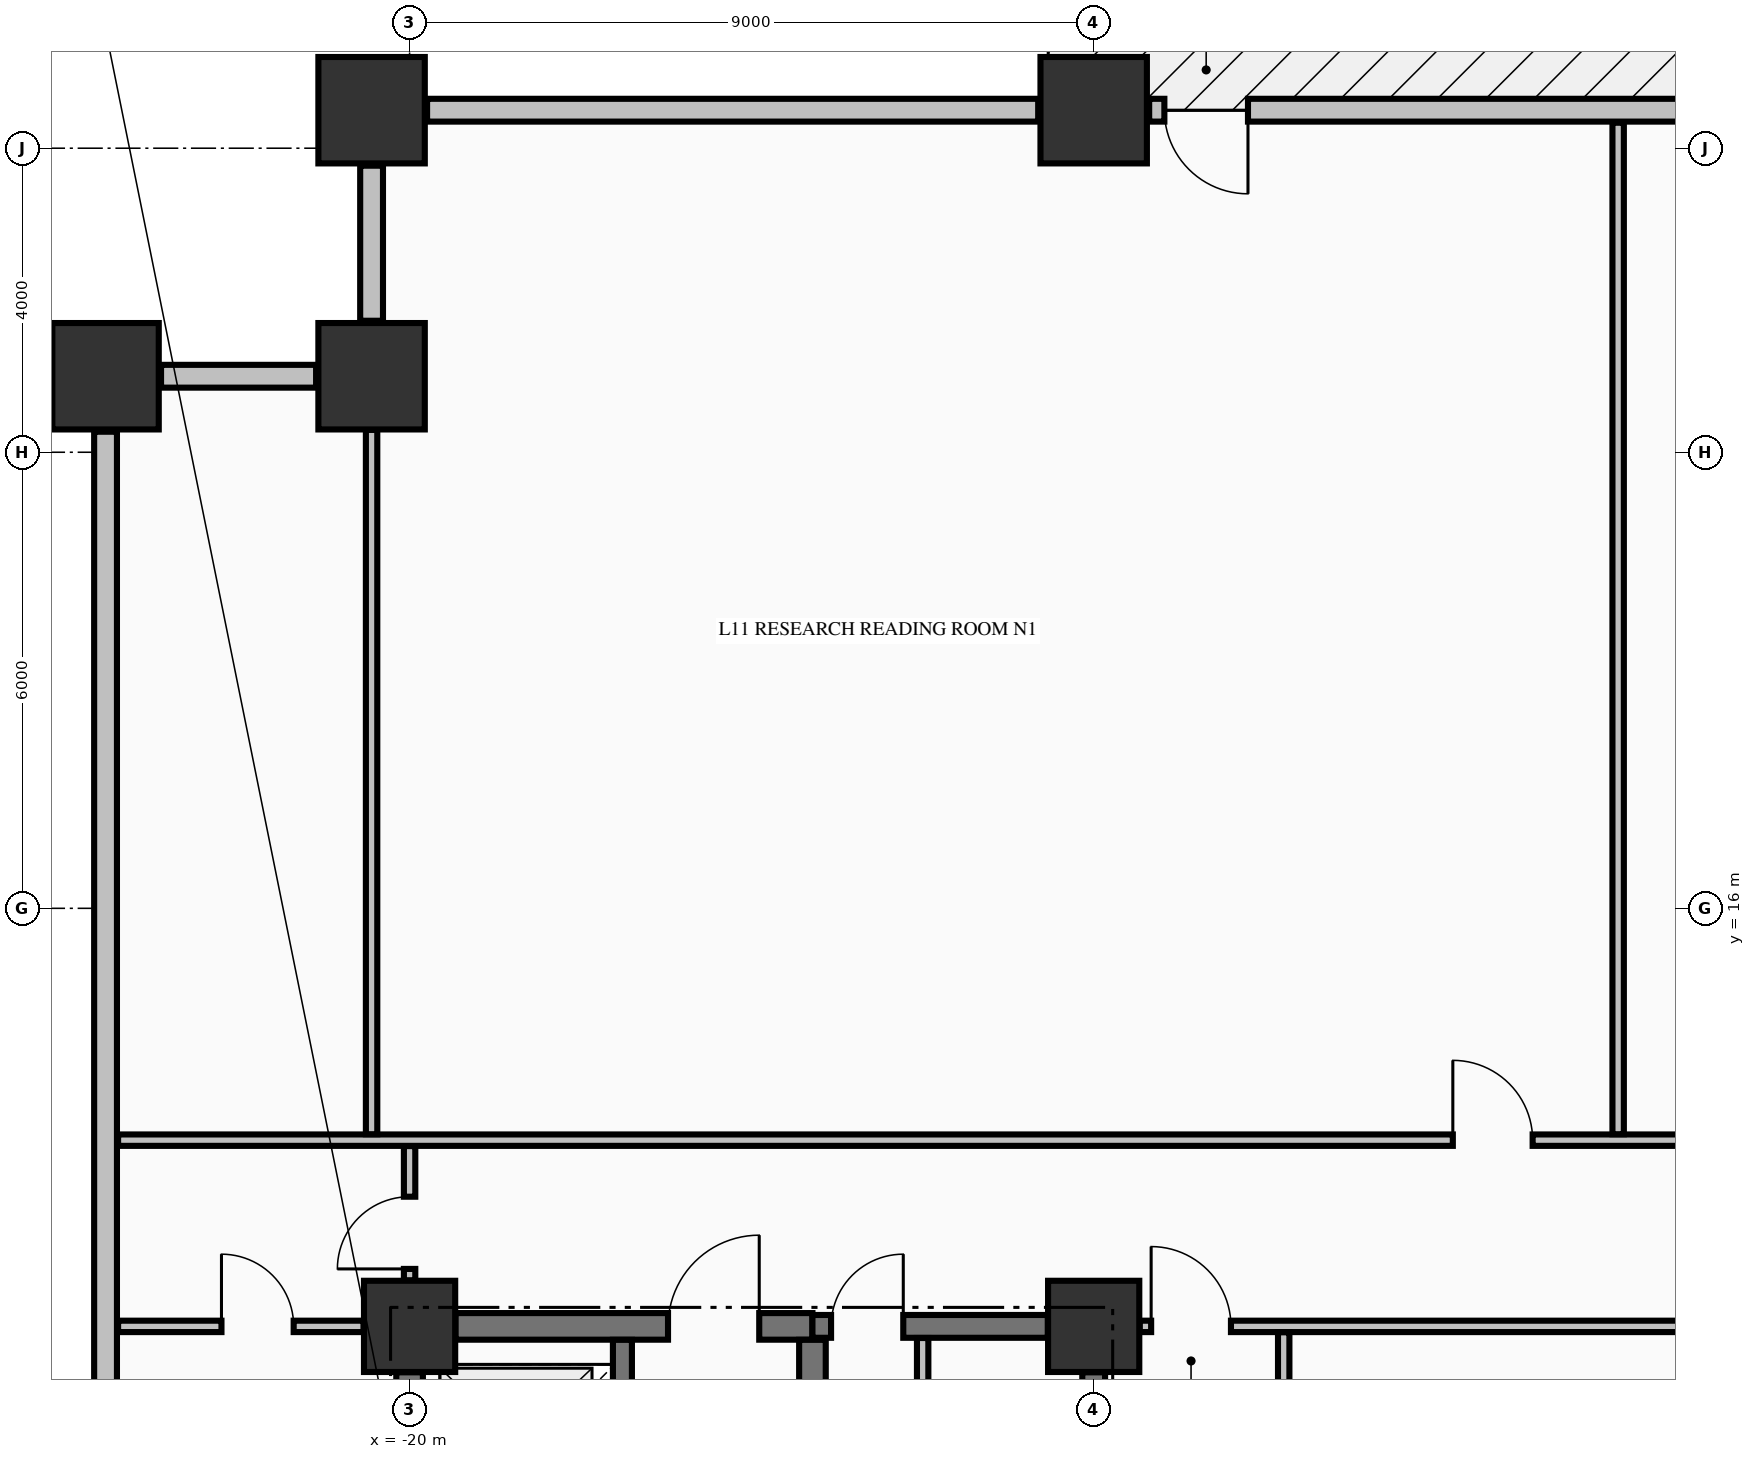
"""IFC4 building model, lengths in metres.
Left out: names, types, materials, properties, quantities, classifications, styles, units other than length and angle.
Written with IfcOpenShell. Run it as: python <this file> out.ifc"""

import sys

from ifc_helpers import new_model, si_unit, direction, frame, frame_2d, origin, origin_2d, place, context, subcontext, project, spatial, rectangle, extrude, element, fill, save


model = new_model("IFC4")
c1 = context("Model", 3, precision=1e-05, world=origin(), true_north=direction((0.0, 1.0)))
c2 = subcontext(c1, "Body", "Model", "MODEL_VIEW")
j1 = project(units=[si_unit("LENGTHUNIT", "METRE"), si_unit("PLANEANGLEUNIT", "RADIAN")], contexts=[c1])
p1 = place(None, origin())
s1 = spatial("IfcSite", under=j1, at=p1, CompositionType="ELEMENT")
p2 = place(p1, origin())
s2 = spatial("IfcBuilding", under=s1, at=p2, CompositionType="ELEMENT")
p3 = place(p2, frame((0.0, 0.0, 48.62)))
s3 = spatial("IfcBuildingStorey", under=s2, at=p3, CompositionType="ELEMENT", Elevation=48.62)
for number, where, z_axis, x_axis in (
    (1, (-20.5, 26.5, -0.25), (0.0, 0.0, 1.0), (1.0, 0.0, 0.0)),
    (2, (-11.0, 26.5, -0.25), (0.0, 0.0, 1.0), (1.0, 0.0, 0.0)),
    (3, (-24.0, 23.0, -0.25), (0.0, 0.0, 1.0), (1.0, 0.0, 0.0)),
    (4, (-20.5, 23.0, -0.25), (0.0, 0.0, 1.0), (1.0, 0.0, 0.0)),
):
    element("IfcColumn", number, at=place(p3, frame(where, z_axis=z_axis, x_axis=x_axis)), inside=s3, PredefinedType="COLUMN", context=c2, shape_type="SweptSolid", body=[
        extrude(rectangle(XDim=1.4, YDim=1.4, at=origin_2d()), origin(), (0.0, 0.0, 1.0), 3.395),
    ])
for number, where, z_axis, x_axis in (
    (5, (-20.0, 10.5, -0.25), (0.0, 0.0, 1.0), (1.0, 0.0, 0.0)),
    (6, (-11.0, 10.5, -0.25), (0.0, 0.0, 1.0), (1.0, 0.0, 0.0)),
):
    element("IfcColumn", number, at=place(p3, frame(where, z_axis=z_axis, x_axis=x_axis)), inside=s3, PredefinedType="COLUMN", context=c2, shape_type="SweptSolid", body=[
        extrude(rectangle(XDim=1.2, YDim=1.2, at=origin_2d()), origin(), (0.0, 0.0, 1.0), 3.395),
    ])
for number, where, z_axis, x_axis in (
    (7, (-20.5, 25.77, 0.0), (0.0, 0.0, 1.0), (0.0, -1.0, 0.0)),
    (8, (-21.23, 23.0, 0.0), (0.0, 0.0, 1.0), (-1.0, 0.0, 0.0)),
):
    element("IfcWall", number, at=place(p3, frame(where, z_axis=z_axis, x_axis=x_axis)), inside=s3, PredefinedType="STANDARD", context=c2, shape_type="SweptSolid", body=[
        extrude(rectangle(XDim=2.04, YDim=0.3, at=frame_2d((1.02, 0.0))), origin(), (0.0, 0.0, 1.0), 2.537),
    ])
p4 = place(p3, frame((-11.73, 26.5, 0.0), z_axis=(0.0, 0.0, 1.0), x_axis=(-1.0, 0.0, 0.0)))
e9 = element("IfcWall", 9, at=p4, inside=s3, PredefinedType="STANDARD", context=c2, shape_type="SweptSolid", body=[
    extrude(rectangle(XDim=8.04, YDim=0.3, at=frame_2d((4.02, 0.0))), origin(), (0.0, 0.0, 1.0), 2.537),
])
p5 = place(p3, frame((-0.73, 26.5, 0.0), z_axis=(0.0, 0.0, 1.0), x_axis=(-1.0, 0.0, 0.0)))
e10 = element("IfcWall", 10, at=p5, inside=s3, PredefinedType="STANDARD", context=c2, shape_type="SweptSolid", body=[
    extrude(rectangle(XDim=9.54, YDim=0.3, at=frame_2d((4.77, 0.0))), origin(), (0.0, 0.0, 1.0), 2.537),
])
p6 = place(p5, frame((8.24, 0.0, 0.0)))
e11 = element("IfcOpeningElement", 11, at=p6, cuts=e10, PredefinedType="OPENING", context=c2, shape_type="SweptSolid", body=[
    extrude(rectangle(XDim=1.1, YDim=2.15, at=frame_2d((0.55, 1.075))), frame((0.0, 0.16, 0.0), z_axis=(0.0, -1.0, 0.0), x_axis=(1.0, 0.0, 0.0)), (0.0, 0.0, 1.0), 0.32),
])
p7 = place(p3, frame((-24.0, 22.27, 0.0), z_axis=(0.0, 0.0, 1.0), x_axis=(0.0, -1.0, 0.0)))
e12 = element("IfcWall", 12, at=p7, inside=s3, PredefinedType="STANDARD", context=c2, shape_type="SweptSolid", body=[
    extrude(rectangle(XDim=12.54, YDim=0.3, at=frame_2d((6.27, 0.0))), origin(), (0.0, 0.0, 1.0), 2.537),
])
p8 = place(p3, frame((-19.396, 10.5, 0.0), z_axis=(0.0, 0.0, 1.0), x_axis=(1.0, 0.0, 0.0)))
e13 = element("IfcWall", 13, at=p8, inside=s3, PredefinedType="SHEAR", context=c2, shape_type="SweptSolid", body=[
    extrude(rectangle(XDim=4.696, YDim=0.35, at=frame_2d((2.348, 0.0))), origin(), (0.0, 0.0, 1.0), 3.145),
])
p9 = place(p8, frame((2.796, 0.0, 0.0)))
e14 = element("IfcOpeningElement", 14, at=p9, cuts=e13, PredefinedType="OPENING", context=c2, shape_type="SweptSolid", body=[
    extrude(rectangle(XDim=1.2, YDim=2.15, at=frame_2d((0.6, 1.075))), frame((0.0, 0.185, 0.0), z_axis=(0.0, -1.0, 0.0), x_axis=(1.0, 0.0, 0.0)), (0.0, 0.0, 1.0), 0.37),
])
p10 = place(p3, frame((-14.7, 10.5, 0.0), z_axis=(0.0, 0.0, 1.0), x_axis=(1.0, 0.0, 0.0)))
e15 = element("IfcWall", 15, at=p10, inside=s3, PredefinedType="SHEAR", context=c2, shape_type="SweptSolid", body=[
    extrude(rectangle(XDim=3.096, YDim=0.3, at=frame_2d((1.548, 0.0))), origin(), (0.0, 0.0, 1.0), 3.145),
])
p11 = place(p10, frame((0.245, 0.0, 0.0)))
e16 = element("IfcOpeningElement", 16, at=p11, cuts=e15, PredefinedType="OPENING", context=c2, shape_type="SweptSolid", body=[
    extrude(rectangle(XDim=0.95, YDim=2.15, at=frame_2d((0.475, 1.075))), frame((0.0, 0.16, 0.0), z_axis=(0.0, -1.0, 0.0), x_axis=(1.0, 0.0, 0.0)), (0.0, 0.0, 1.0), 0.32),
])
p12 = place(p3, frame((-23.835, 10.5, 0.0), z_axis=(0.0, 0.0, 1.0), x_axis=(1.0, 0.0, 0.0)))
e17 = element("IfcWall", 17, at=p12, inside=s3, PredefinedType="PARTITIONING", context=c2, shape_type="SweptSolid", body=[
    extrude(rectangle(XDim=3.229, YDim=0.15, at=frame_2d((1.615, 0.0))), origin(), (0.0, 0.0, 1.0), 3.145),
])
p13 = place(p12, frame((1.36, 0.0, 0.0)))
e18 = element("IfcOpeningElement", 18, at=p13, cuts=e17, PredefinedType="OPENING", context=c2, shape_type="SweptSolid", body=[
    extrude(rectangle(XDim=0.95, YDim=2.15, at=frame_2d((0.475, 1.075))), frame((0.0, 0.085, 0.0), z_axis=(0.0, -1.0, 0.0), x_axis=(1.0, 0.0, 0.0)), (0.0, 0.0, 1.0), 0.17),
])
p14 = place(p3, frame((-10.394, 10.5, 0.0), z_axis=(0.0, 0.0, 1.0), x_axis=(1.0, 0.0, 0.0)))
e19 = element("IfcWall", 19, at=p14, inside=s3, PredefinedType="PARTITIONING", context=c2, shape_type="SweptSolid", body=[
    extrude(rectangle(XDim=20.788, YDim=0.15, at=frame_2d((10.394, 0.0))), origin(), (0.0, 0.0, 1.0), 3.145),
])
p15 = place(p14, frame((0.15, 0.0, 0.0)))
e20 = element("IfcOpeningElement", 20, at=p15, cuts=e19, PredefinedType="OPENING", context=c2, shape_type="SweptSolid", body=[
    extrude(rectangle(XDim=1.05, YDim=2.15, at=frame_2d((0.525, 1.075))), frame((0.0, 0.085, 0.0), z_axis=(0.0, -1.0, 0.0), x_axis=(1.0, 0.0, 0.0)), (0.0, 0.0, 1.0), 0.17),
])
p16 = place(p14, frame((19.588, 0.0, 0.0)))
e21 = element("IfcOpeningElement", 21, at=p16, cuts=e19, PredefinedType="OPENING", context=c2, shape_type="SweptSolid", body=[
    extrude(rectangle(XDim=1.05, YDim=2.15, at=frame_2d((0.525, 1.075))), frame((0.0, 0.085, 0.0), z_axis=(0.0, -1.0, 0.0), x_axis=(1.0, 0.0, 0.0)), (0.0, 0.0, 1.0), 0.17),
])
p17 = place(p3, frame((-23.835, 12.95, 0.0), z_axis=(0.0, 0.0, 1.0), x_axis=(1.0, 0.0, 0.0)))
e22 = element("IfcWall", 22, at=p17, inside=s3, PredefinedType="PARTITIONING", context=c2, shape_type="SweptSolid", body=[
    extrude(rectangle(XDim=52.67, YDim=0.15, at=frame_2d((26.335, 0.0))), origin(), (0.0, 0.0, 1.0), 3.145),
])
p18 = place(p17, frame((17.56, 0.0, 0.0)))
e23 = element("IfcOpeningElement", 23, at=p18, cuts=e22, PredefinedType="OPENING", context=c2, shape_type="SweptSolid", body=[
    extrude(rectangle(XDim=1.05, YDim=2.15, at=frame_2d((0.525, 1.075))), frame((0.0, 0.085, 0.0), z_axis=(0.0, -1.0, 0.0), x_axis=(1.0, 0.0, 0.0)), (0.0, 0.0, 1.0), 0.17),
])
p19 = place(p17, frame((31.16, 0.0, 0.0)))
e24 = element("IfcOpeningElement", 24, at=p19, cuts=e22, PredefinedType="OPENING", context=c2, shape_type="SweptSolid", body=[
    extrude(rectangle(XDim=1.05, YDim=2.15, at=frame_2d((0.525, 1.075))), frame((0.0, 0.085, 0.0), z_axis=(0.0, -1.0, 0.0), x_axis=(1.0, 0.0, 0.0)), (0.0, 0.0, 1.0), 0.17),
])
p20 = place(p3, frame((-20.0, 7.727, 0.0), z_axis=(0.0, 0.0, 1.0), x_axis=(0.0, 1.0, 0.0)))
e25 = element("IfcWall", 25, at=p20, inside=s3, PredefinedType="SHEAR", context=c2, shape_type="SweptSolid", body=[
    extrude(rectangle(XDim=2.169, YDim=0.35, at=frame_2d((1.084, 0.0))), origin(), (0.0, 0.0, 1.0), 3.145),
])
p21 = place(p3, frame((-17.2, 7.727, 0.0), z_axis=(0.0, 0.0, 1.0), x_axis=(0.0, 1.0, 0.0)))
e26 = element("IfcWall", 26, at=p21, inside=s3, PredefinedType="SOLIDWALL", context=c2, shape_type="SweptSolid", body=[
    extrude(rectangle(XDim=2.596, YDim=0.25, at=frame_2d((1.298, 0.0))), origin(), (0.0, 0.0, 1.0), 3.145),
])
p22 = place(p21, frame((0.773, 0.0, 0.0)))
e27 = element("IfcOpeningElement", 27, at=p22, cuts=e26, PredefinedType="OPENING", context=c2, shape_type="SweptSolid", body=[
    extrude(rectangle(XDim=1.1, YDim=2.2, at=frame_2d((0.55, 1.1))), frame((0.0, 0.135, 0.0), z_axis=(0.0, -1.0, 0.0), x_axis=(1.0, 0.0, 0.0)), (0.0, 0.0, 1.0), 0.27),
])
p23 = place(p3, frame((-14.7, 5.852, 0.0), z_axis=(0.0, 0.0, 1.0), x_axis=(0.0, 1.0, 0.0)))
e28 = element("IfcWall", 28, at=p23, inside=s3, PredefinedType="SHEAR", context=c2, shape_type="SweptSolid", body=[
    extrude(rectangle(XDim=4.471, YDim=0.35, at=frame_2d((2.235, 0.0))), origin(), (0.0, 0.0, 1.0), 3.145),
])
p24 = place(p3, frame((-11.0, 5.852, 0.0), z_axis=(0.0, 0.0, 1.0), x_axis=(0.0, 1.0, 0.0)))
e29 = element("IfcWall", 29, at=p24, inside=s3, PredefinedType="SHEAR", context=c2, shape_type="SweptSolid", body=[
    extrude(rectangle(XDim=4.044, YDim=0.3, at=frame_2d((2.022, 0.0))), origin(), (0.0, 0.0, 1.0), 3.145),
])
p25 = place(p3, frame((-20.5, 13.028, 0.0), z_axis=(0.0, 0.0, 1.0), x_axis=(0.0, 1.0, 0.0)))
e30 = element("IfcWall", 30, at=p25, inside=s3, PredefinedType="PARTITIONING", context=c2, shape_type="SweptSolid", body=[
    extrude(rectangle(XDim=9.266, YDim=0.15, at=frame_2d((4.633, 0.0))), origin(), (0.0, 0.0, 1.0), 3.145),
])
p26 = place(p3, frame((-20.0, 11.106, 0.0), z_axis=(0.0, 0.0, 1.0), x_axis=(0.0, 1.0, 0.0)))
e31 = element("IfcWall", 31, at=p26, inside=s3, PredefinedType="PARTITIONING", context=c2, shape_type="SweptSolid", body=[
    extrude(rectangle(XDim=1.766, YDim=0.15, at=frame_2d((0.883, 0.0))), origin(), (0.0, 0.0, 1.0), 3.145),
])
p27 = place(p26, frame((0.15, 0.0, 0.0)))
e32 = element("IfcOpeningElement", 32, at=p27, cuts=e31, PredefinedType="OPENING", context=c2, shape_type="SweptSolid", body=[
    extrude(rectangle(XDim=0.95, YDim=2.15, at=frame_2d((0.475, 1.075))), frame((0.0, 0.085, 0.0), z_axis=(0.0, -1.0, 0.0), x_axis=(1.0, 0.0, 0.0)), (0.0, 0.0, 1.0), 0.17),
])
p28 = place(p3, frame((-13.25, 5.853, 0.0), z_axis=(0.0, 0.0, 1.0), x_axis=(0.0, 1.0, 0.0)))
e33 = element("IfcWall", 33, at=p28, inside=s3, PredefinedType="PARTITIONING", context=c2, shape_type="SweptSolid", body=[
    extrude(rectangle(XDim=4.494, YDim=0.15, at=frame_2d((2.247, 0.0))), origin(), (0.0, 0.0, 1.0), 3.145),
])
p29 = place(p28, frame((1.472, 0.0, 0.0)))
e34 = element("IfcOpeningElement", 34, at=p29, cuts=e33, PredefinedType="OPENING", context=c2, shape_type="SweptSolid", body=[
    extrude(rectangle(XDim=0.95, YDim=2.15, at=frame_2d((0.475, 1.075))), frame((0.0, 0.085, 0.0), z_axis=(0.0, -1.0, 0.0), x_axis=(1.0, 0.0, 0.0)), (0.0, 0.0, 1.0), 0.17),
])
p30 = place(p3, frame((-8.5, 3.703, 0.0), z_axis=(0.0, 0.0, 1.0), x_axis=(0.0, 1.0, 0.0)))
e35 = element("IfcWall", 35, at=p30, inside=s3, PredefinedType="PARTITIONING", context=c2, shape_type="SweptSolid", body=[
    extrude(rectangle(XDim=6.719, YDim=0.15, at=frame_2d((3.36, 0.0))), origin(), (0.0, 0.0, 1.0), 3.145),
])
p31 = place(p30, frame((2.822, 0.0, 0.0)))
e36 = element("IfcOpeningElement", 36, at=p31, cuts=e35, PredefinedType="OPENING", context=c2, shape_type="SweptSolid", body=[
    extrude(rectangle(XDim=1.05, YDim=2.15, at=frame_2d((0.525, 1.075))), frame((0.0, 0.085, 0.0), z_axis=(0.0, -1.0, 0.0), x_axis=(1.0, 0.0, 0.0)), (0.0, 0.0, 1.0), 0.17),
])
p32 = place(p3, frame((-4.1, 13.028, 0.0), z_axis=(0.0, 0.0, 1.0), x_axis=(0.0, 1.0, 0.0)))
e37 = element("IfcWall", 37, at=p32, inside=s3, PredefinedType="PARTITIONING", context=c2, shape_type="SweptSolid", body=[
    extrude(rectangle(XDim=13.307, YDim=0.15, at=frame_2d((6.653, 0.0))), origin(), (0.0, 0.0, 1.0), 3.145),
])
p33 = place(p6, origin())
e38 = element("IfcDoor", 38, at=p33, inside=s3, OperationType="SINGLE_SWING_LEFT", PredefinedType="DOOR", context=c2, shape_type="SweptSolid", body=[
    extrude(rectangle(XDim=1.1, YDim=2.15, at=frame_2d((0.55, 1.075))), frame((0.0, 0.025, 0.0), z_axis=(0.0, -1.0, 0.0), x_axis=(1.0, 0.0, 0.0)), (0.0, 0.0, 1.0), 0.05),
])
fill(e11, e38)
p34 = place(p11, origin())
e39 = element("IfcDoor", 39, at=p34, inside=s3, OperationType="SINGLE_SWING_RIGHT", PredefinedType="DOOR", context=c2, shape_type="SweptSolid", body=[
    extrude(rectangle(XDim=0.95, YDim=2.15, at=frame_2d((0.475, 1.075))), frame((0.0, 0.025, 0.0), z_axis=(0.0, -1.0, 0.0), x_axis=(1.0, 0.0, 0.0)), (0.0, 0.0, 1.0), 0.05),
])
fill(e16, e39)
p35 = place(p9, origin())
e40 = element("IfcDoor", 40, at=p35, inside=s3, OperationType="SINGLE_SWING_RIGHT", PredefinedType="DOOR", context=c2, shape_type="SweptSolid", body=[
    extrude(rectangle(XDim=1.2, YDim=2.15, at=frame_2d((0.6, 1.075))), frame((0.0, 0.025, 0.0), z_axis=(0.0, -1.0, 0.0), x_axis=(1.0, 0.0, 0.0)), (0.0, 0.0, 1.0), 0.05),
])
fill(e14, e40)
p36 = place(p15, origin())
e41 = element("IfcDoor", 41, at=p36, inside=s3, OperationType="SINGLE_SWING_LEFT", PredefinedType="DOOR", context=c2, shape_type="SweptSolid", body=[
    extrude(rectangle(XDim=1.05, YDim=2.15, at=frame_2d((0.525, 1.075))), frame((0.0, 0.025, 0.0), z_axis=(0.0, -1.0, 0.0), x_axis=(1.0, 0.0, 0.0)), (0.0, 0.0, 1.0), 0.05),
])
fill(e20, e41)
p37 = place(p18, origin())
e42 = element("IfcDoor", 42, at=p37, inside=s3, OperationType="SINGLE_SWING_LEFT", PredefinedType="DOOR", context=c2, shape_type="SweptSolid", body=[
    extrude(rectangle(XDim=1.05, YDim=2.15, at=frame_2d((0.525, 1.075))), frame((0.0, 0.025, 0.0), z_axis=(0.0, -1.0, 0.0), x_axis=(1.0, 0.0, 0.0)), (0.0, 0.0, 1.0), 0.05),
])
fill(e23, e42)
p38 = place(p27, origin())
e43 = element("IfcDoor", 43, at=p38, inside=s3, OperationType="SINGLE_SWING_LEFT", PredefinedType="DOOR", context=c2, shape_type="SweptSolid", body=[
    extrude(rectangle(XDim=0.95, YDim=2.15, at=frame_2d((0.475, 1.075))), frame((0.0, 0.025, 0.0), z_axis=(0.0, -1.0, 0.0), x_axis=(1.0, 0.0, 0.0)), (0.0, 0.0, 1.0), 0.05),
])
fill(e32, e43)
p39 = place(p13, origin())
e44 = element("IfcDoor", 44, at=p39, inside=s3, OperationType="SINGLE_SWING_LEFT", PredefinedType="DOOR", context=c2, shape_type="SweptSolid", body=[
    extrude(rectangle(XDim=0.95, YDim=2.15, at=frame_2d((0.475, 1.075))), frame((0.0, 0.025, 0.0), z_axis=(0.0, -1.0, 0.0), x_axis=(1.0, 0.0, 0.0)), (0.0, 0.0, 1.0), 0.05),
])
fill(e18, e44)
save(model, sys.argv[1])
